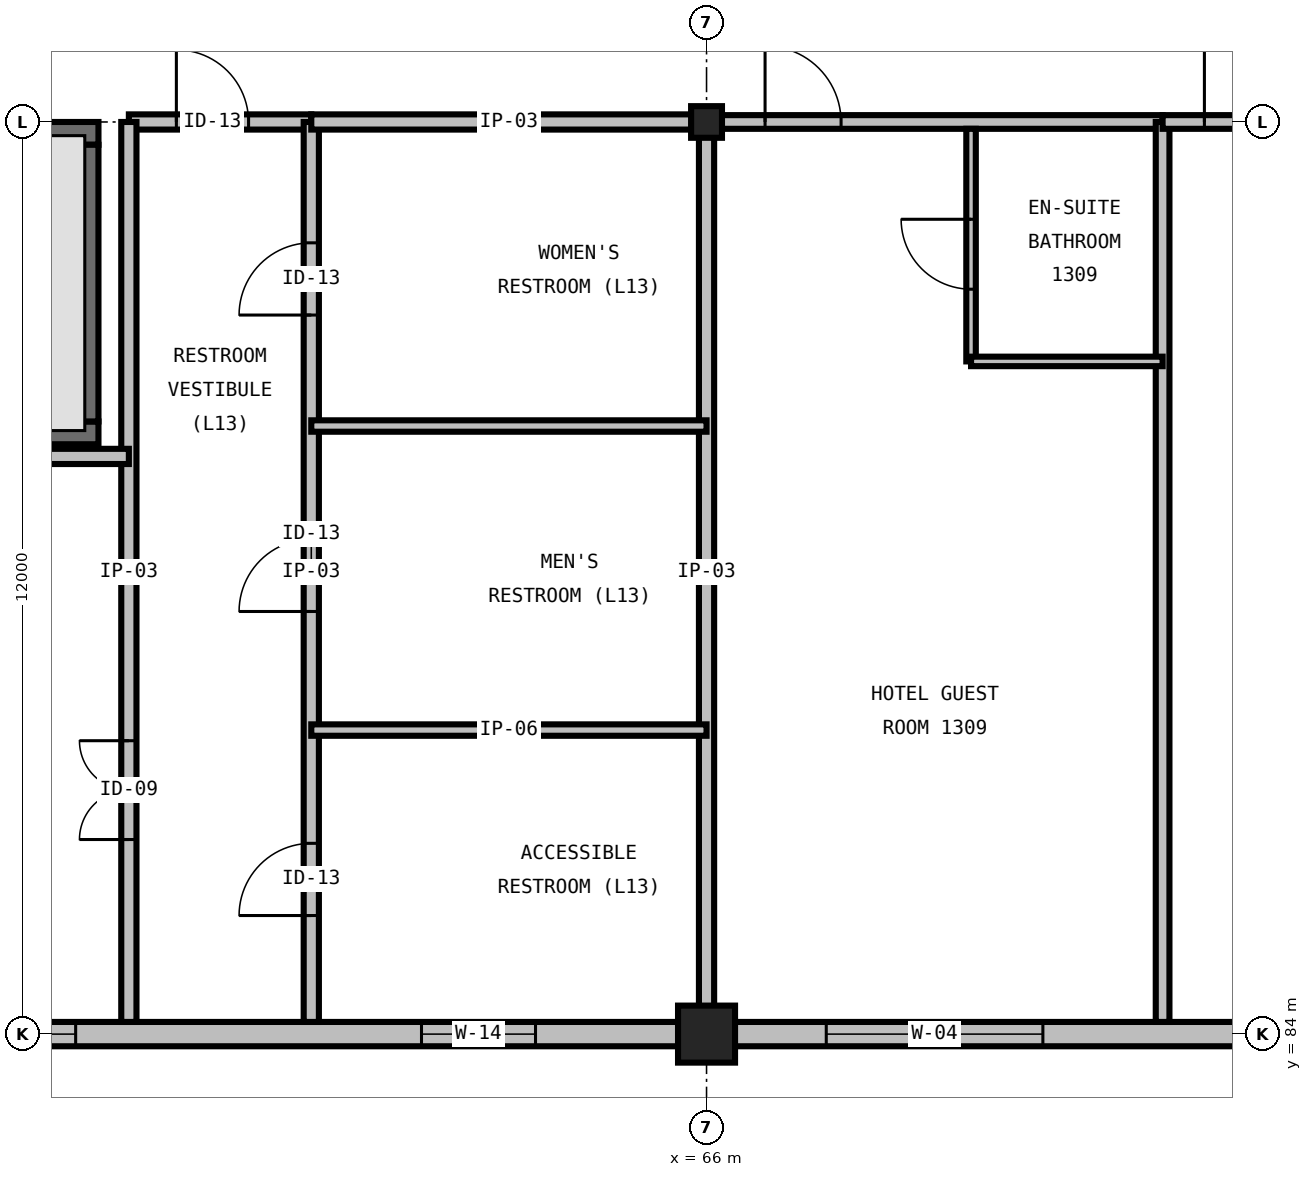
"""IFC4 building model, lengths in metres.
Left out: names, types, materials, properties, quantities, classifications, styles, units other than length and angle.
Written with IfcOpenShell. Run it as: python <this file> out.ifc"""

import sys

from ifc_helpers import new_model, si_unit, direction, frame, frame_2d, origin, origin_2d, place, context, subcontext, project, spatial, rectangle, i_section, extrude, element, fill, save


model = new_model("IFC4")
c1 = context("Model", 3, precision=1e-05, world=origin(), true_north=direction((0.0, 1.0)))
c2 = subcontext(c1, "Body", "Model", "MODEL_VIEW")
j1 = project(units=[si_unit("LENGTHUNIT", "METRE"), si_unit("PLANEANGLEUNIT", "RADIAN")], contexts=[c1])
p1 = place(None, origin())
s1 = spatial("IfcSite", under=j1, at=p1, CompositionType="ELEMENT")
p2 = place(p1, origin())
s2 = spatial("IfcBuilding", under=s1, at=p2, CompositionType="ELEMENT")
p3 = place(p2, frame((0.0, 0.0, 56.4)))
s3 = spatial("IfcBuildingStorey", under=s2, at=p3, CompositionType="ELEMENT", Elevation=56.4)
p4 = place(p3, frame((66.0, 84.0, 0.0), z_axis=(0.0, 0.0, 1.0), x_axis=(1.0, 0.0, 0.0)))
e1 = element("IfcColumn", 1, at=p4, inside=s3, PredefinedType="COLUMN", context=c2, shape_type="SweptSolid", body=[
    extrude(rectangle(XDim=0.75, YDim=0.75, at=origin_2d()), origin(), (0.0, 0.0, 1.0), 3.6),
])
p5 = place(p3, frame((66.0, 96.0, 0.0), z_axis=(0.0, 0.0, 1.0), x_axis=(1.0, 0.0, 0.0)))
e2 = element("IfcColumn", 2, at=p5, inside=s3, PredefinedType="COLUMN", context=c2, shape_type="SweptSolid", body=[
    extrude(i_section(OverallWidth=0.406, OverallDepth=0.416, WebThickness=0.03, FlangeThickness=0.048, FilletRadius=0.031, at=origin_2d()), origin(), (0.0, 0.0, 1.0), 3.6),
])
p6 = place(p3, frame((48.2, 91.91, 0.0), z_axis=(0.0, 0.0, 1.0), x_axis=(1.0, 0.0, 0.0)))
e3 = element("IfcWall", 3, at=p6, inside=s3, PredefinedType="SHEAR", context=c2, shape_type="SweptSolid", body=[
    extrude(rectangle(XDim=9.8, YDim=0.3, at=frame_2d((4.9, 0.0))), origin(), (0.0, 0.0, 1.0), 3.6),
])
p7 = place(p3, frame((58.0, 95.85, 0.0), z_axis=(0.0, 0.0, 1.0), x_axis=(-1.0, 0.0, 0.0)))
e4 = element("IfcWall", 4, at=p7, inside=s3, PredefinedType="SHEAR", context=c2, shape_type="SweptSolid", body=[
    extrude(rectangle(XDim=9.8, YDim=0.3, at=frame_2d((4.9, 0.0))), origin(), (0.0, 0.0, 1.0), 3.6),
])
p8 = place(p7, frame((8.25, 0.0, 0.0)))
e5 = element("IfcOpeningElement", 5, at=p8, cuts=e4, PredefinedType="OPENING", context=c2, shape_type="SweptSolid", body=[
    extrude(rectangle(XDim=1.1, YDim=2.2, at=frame_2d((0.55, 1.1))), frame((0.0, 0.165, 0.0), z_axis=(0.0, -1.0, 0.0), x_axis=(1.0, 0.0, 0.0)), (0.0, 0.0, 1.0), 0.33),
])
p9 = place(p3, frame((57.85, 92.06, 0.0), z_axis=(0.0, 0.0, 1.0), x_axis=(0.0, 1.0, 0.0)))
e6 = element("IfcWall", 6, at=p9, inside=s3, PredefinedType="SHEAR", context=c2, shape_type="SweptSolid", body=[
    extrude(rectangle(XDim=3.64, YDim=0.3, at=frame_2d((1.82, 0.0))), origin(), (0.0, 0.0, 1.0), 3.6),
])
p10 = place(p3, frame((54.0, 84.0, 0.0), z_axis=(0.0, 0.0, 1.0), x_axis=(1.0, 0.0, 0.0)))
e7 = element("IfcWall", 7, at=p10, inside=s3, PredefinedType="STANDARD", context=c2, shape_type="SweptSolid", body=[
    extrude(rectangle(XDim=12.0, YDim=0.32, at=frame_2d((6.0, 0.0))), origin(), (0.0, 0.0, 1.0), 2.536),
])
p11 = place(p10, frame((2.3, 0.0, 1.0)))
e8 = element("IfcOpeningElement", 8, at=p11, cuts=e7, PredefinedType="OPENING", context=c2, shape_type="SweptSolid", body=[
    extrude(rectangle(XDim=1.4, YDim=1.4, at=frame_2d((0.7, 0.7))), frame((0.0, 0.175, 0.0), z_axis=(0.0, -1.0, 0.0), x_axis=(1.0, 0.0, 0.0)), (0.0, 0.0, 1.0), 0.35),
])
p12 = place(p10, frame((8.25, 0.0, 1.0)))
e9 = element("IfcOpeningElement", 9, at=p12, cuts=e7, PredefinedType="OPENING", context=c2, shape_type="SweptSolid", body=[
    extrude(rectangle(XDim=1.5, YDim=1.35, at=frame_2d((0.75, 0.675))), frame((0.0, 0.175, 0.0), z_axis=(0.0, -1.0, 0.0), x_axis=(1.0, 0.0, 0.0)), (0.0, 0.0, 1.0), 0.35),
])
p13 = place(p3, frame((66.0, 84.0, 0.0), z_axis=(0.0, 0.0, 1.0), x_axis=(1.0, 0.0, 0.0)))
e10 = element("IfcWall", 10, at=p13, inside=s3, PredefinedType="STANDARD", context=c2, shape_type="SweptSolid", body=[
    extrude(rectangle(XDim=12.0, YDim=0.32, at=frame_2d((6.0, 0.0))), origin(), (0.0, 0.0, 1.0), 2.536),
])
p14 = place(p13, frame((1.575, 0.0, 0.7)))
e11 = element("IfcOpeningElement", 11, at=p14, cuts=e10, PredefinedType="OPENING", context=c2, shape_type="SweptSolid", body=[
    extrude(rectangle(XDim=2.85, YDim=1.65, at=frame_2d((1.425, 0.825))), frame((0.0, 0.175, 0.0), z_axis=(0.0, -1.0, 0.0), x_axis=(1.0, 0.0, 0.0)), (0.0, 0.0, 1.0), 0.35),
])
p15 = place(p13, frame((7.575, 0.0, 0.7)))
e12 = element("IfcOpeningElement", 12, at=p15, cuts=e10, PredefinedType="OPENING", context=c2, shape_type="SweptSolid", body=[
    extrude(rectangle(XDim=2.85, YDim=1.65, at=frame_2d((1.425, 0.825))), frame((0.0, 0.175, 0.0), z_axis=(0.0, -1.0, 0.0), x_axis=(1.0, 0.0, 0.0)), (0.0, 0.0, 1.0), 0.35),
])
p16 = place(p3, frame((58.4, 96.0, 0.0), z_axis=(0.0, 0.0, 1.0), x_axis=(1.0, 0.0, 0.0)))
e13 = element("IfcWall", 13, at=p16, inside=s3, PredefinedType="PARTITIONING", context=c2, shape_type="SweptSolid", body=[
    extrude(rectangle(XDim=2.4, YDim=0.2, at=frame_2d((1.2, 0.0))), origin(), (0.0, 0.0, 1.0), 2.359),
])
p17 = place(p16, frame((0.625, 0.0, 0.0)))
e14 = element("IfcOpeningElement", 14, at=p17, cuts=e13, PredefinedType="OPENING", context=c2, shape_type="SweptSolid", body=[
    extrude(rectangle(XDim=0.95, YDim=2.15, at=frame_2d((0.475, 1.075))), frame((0.0, 0.115, 0.0), z_axis=(0.0, -1.0, 0.0), x_axis=(1.0, 0.0, 0.0)), (0.0, 0.0, 1.0), 0.23),
])
p18 = place(p3, frame((58.4, 84.16, 0.0), z_axis=(0.0, 0.0, 1.0), x_axis=(0.0, 1.0, 0.0)))
e15 = element("IfcWall", 15, at=p18, inside=s3, PredefinedType="PARTITIONING", context=c2, shape_type="SweptSolid", body=[
    extrude(rectangle(XDim=11.84, YDim=0.2, at=frame_2d((5.92, 0.0))), origin(), (0.0, 0.0, 1.0), 3.29),
])
p19 = place(p18, frame((2.4, 0.0, 0.0)))
e16 = element("IfcOpeningElement", 16, at=p19, cuts=e15, PredefinedType="OPENING", context=c2, shape_type="SweptSolid", body=[
    extrude(rectangle(XDim=1.3, YDim=2.2, at=frame_2d((0.65, 1.1))), frame((0.0, 0.115, 0.0), z_axis=(0.0, -1.0, 0.0), x_axis=(1.0, 0.0, 0.0)), (0.0, 0.0, 1.0), 0.23),
])
p20 = place(p3, frame((60.8, 84.16, 0.0), z_axis=(0.0, 0.0, 1.0), x_axis=(0.0, 1.0, 0.0)))
e17 = element("IfcWall", 17, at=p20, inside=s3, PredefinedType="PARTITIONING", context=c2, shape_type="SweptSolid", body=[
    extrude(rectangle(XDim=11.84, YDim=0.2, at=frame_2d((5.92, 0.0))), origin(), (0.0, 0.0, 1.0), 3.29),
])
p21 = place(p20, frame((1.4, 0.0, 0.0)))
e18 = element("IfcOpeningElement", 18, at=p21, cuts=e17, PredefinedType="OPENING", context=c2, shape_type="SweptSolid", body=[
    extrude(rectangle(XDim=0.95, YDim=2.15, at=frame_2d((0.475, 1.075))), frame((0.0, 0.115, 0.0), z_axis=(0.0, -1.0, 0.0), x_axis=(1.0, 0.0, 0.0)), (0.0, 0.0, 1.0), 0.23),
])
p22 = place(p20, frame((5.4, 0.0, 0.0)))
e19 = element("IfcOpeningElement", 19, at=p22, cuts=e17, PredefinedType="OPENING", context=c2, shape_type="SweptSolid", body=[
    extrude(rectangle(XDim=0.95, YDim=2.15, at=frame_2d((0.475, 1.075))), frame((0.0, 0.115, 0.0), z_axis=(0.0, -1.0, 0.0), x_axis=(1.0, 0.0, 0.0)), (0.0, 0.0, 1.0), 0.23),
])
p23 = place(p20, frame((9.3, 0.0, 0.0)))
e20 = element("IfcOpeningElement", 20, at=p23, cuts=e17, PredefinedType="OPENING", context=c2, shape_type="SweptSolid", body=[
    extrude(rectangle(XDim=0.95, YDim=2.15, at=frame_2d((0.475, 1.075))), frame((0.0, 0.115, 0.0), z_axis=(0.0, -1.0, 0.0), x_axis=(1.0, 0.0, 0.0)), (0.0, 0.0, 1.0), 0.23),
])
p24 = place(p3, frame((66.0, 84.16, 0.0), z_axis=(0.0, 0.0, 1.0), x_axis=(0.0, 1.0, 0.0)))
e21 = element("IfcWall", 21, at=p24, inside=s3, PredefinedType="PARTITIONING", context=c2, shape_type="SweptSolid", body=[
    extrude(rectangle(XDim=11.84, YDim=0.2, at=frame_2d((5.92, 0.0))), origin(), (0.0, 0.0, 1.0), 2.59),
])
p25 = place(p3, frame((60.8, 96.0, 0.0), z_axis=(0.0, 0.0, 1.0), x_axis=(1.0, 0.0, 0.0)))
e22 = element("IfcWall", 22, at=p25, inside=s3, PredefinedType="PARTITIONING", context=c2, shape_type="SweptSolid", body=[
    extrude(rectangle(XDim=5.2, YDim=0.2, at=frame_2d((2.6, 0.0))), origin(), (0.0, 0.0, 1.0), 2.359),
])
for number, where, z_axis, x_axis in (
    (23, (60.8, 88.0, 0.0), (0.0, 0.0, 1.0), (1.0, 0.0, 0.0)),
    (24, (60.8, 92.0, 0.0), (0.0, 0.0, 1.0), (1.0, 0.0, 0.0)),
):
    element("IfcWall", number, at=place(p3, frame(where, z_axis=z_axis, x_axis=x_axis)), inside=s3, PredefinedType="PARTITIONING", context=c2, shape_type="SweptSolid", body=[
        extrude(rectangle(XDim=5.2, YDim=0.15, at=frame_2d((2.6, 0.0))), origin(), (0.0, 0.0, 1.0), 3.29),
    ])
p26 = place(p3, frame((48.0, 91.6, 0.0), z_axis=(0.0, 0.0, 1.0), x_axis=(1.0, 0.0, 0.0)))
e25 = element("IfcWall", 25, at=p26, inside=s3, PredefinedType="PARTITIONING", context=c2, shape_type="SweptSolid", body=[
    extrude(rectangle(XDim=10.4, YDim=0.2, at=frame_2d((5.2, 0.0))), origin(), (0.0, 0.0, 1.0), 3.29),
])
p27 = place(p3, frame((66.0, 96.0, 0.0), z_axis=(0.0, 0.0, 1.0), x_axis=(1.0, 0.0, 0.0)))
e26 = element("IfcWall", 26, at=p27, inside=s3, PredefinedType="PARTITIONING", context=c2, shape_type="SweptSolid", body=[
    extrude(rectangle(XDim=6.0, YDim=0.18, at=frame_2d((3.0, 0.0))), origin(), (0.0, 0.0, 1.0), 2.664),
])
p28 = place(p27, frame((0.77, 0.0, 0.0)))
e27 = element("IfcOpeningElement", 27, at=p28, cuts=e26, PredefinedType="OPENING", context=c2, shape_type="SweptSolid", body=[
    extrude(rectangle(XDim=1.0, YDim=2.15, at=frame_2d((0.5, 1.075))), frame((0.0, 0.105, 0.0), z_axis=(0.0, -1.0, 0.0), x_axis=(1.0, 0.0, 0.0)), (0.0, 0.0, 1.0), 0.21),
])
p29 = place(p3, frame((72.0, 84.16, 0.0), z_axis=(0.0, 0.0, 1.0), x_axis=(0.0, 1.0, 0.0)))
e28 = element("IfcWall", 28, at=p29, inside=s3, PredefinedType="PARTITIONING", context=c2, shape_type="SweptSolid", body=[
    extrude(rectangle(XDim=11.84, YDim=0.18, at=frame_2d((5.92, 0.0))), origin(), (0.0, 0.0, 1.0), 3.29),
])
p30 = place(p3, frame((69.48, 92.85, 0.0), z_axis=(0.0, 0.0, 1.0), x_axis=(0.0, 1.0, 0.0)))
e29 = element("IfcWall", 29, at=p30, inside=s3, PredefinedType="PARTITIONING", context=c2, shape_type="SweptSolid", body=[
    extrude(rectangle(XDim=3.06, YDim=0.125, at=frame_2d((1.53, 0.0))), origin(), (0.0, 0.0, 1.0), 3.29),
])
p31 = place(p30, frame((0.95, 0.0, 0.0)))
e30 = element("IfcOpeningElement", 30, at=p31, cuts=e29, PredefinedType="OPENING", context=c2, shape_type="SweptSolid", body=[
    extrude(rectangle(XDim=0.92, YDim=2.1, at=frame_2d((0.46, 1.05))), frame((0.0, 0.077, 0.0), z_axis=(0.0, -1.0, 0.0), x_axis=(1.0, 0.0, 0.0)), (0.0, 0.0, 1.0), 0.155),
])
p32 = place(p3, frame((69.48, 92.85, 0.0), z_axis=(0.0, 0.0, 1.0), x_axis=(1.0, 0.0, 0.0)))
e31 = element("IfcWall", 31, at=p32, inside=s3, PredefinedType="PARTITIONING", context=c2, shape_type="SweptSolid", body=[
    extrude(rectangle(XDim=2.52, YDim=0.125, at=frame_2d((1.26, 0.0))), origin(), (0.0, 0.0, 1.0), 3.29),
])
p33 = place(p3, frame((72.0, 96.0, 0.0), z_axis=(0.0, 0.0, 1.0), x_axis=(1.0, 0.0, 0.0)))
e32 = element("IfcWall", 32, at=p33, inside=s3, PredefinedType="PARTITIONING", context=c2, shape_type="SweptSolid", body=[
    extrude(rectangle(XDim=11.915, YDim=0.18, at=frame_2d((5.957, 0.0))), origin(), (0.0, 0.0, 1.0), 2.664),
])
p34 = place(p33, frame((0.55, 0.0, 0.0)))
e33 = element("IfcOpeningElement", 33, at=p34, cuts=e32, PredefinedType="OPENING", context=c2, shape_type="SweptSolid", body=[
    extrude(rectangle(XDim=1.1, YDim=2.2, at=frame_2d((0.55, 1.1))), frame((0.0, 0.105, 0.0), z_axis=(0.0, -1.0, 0.0), x_axis=(1.0, 0.0, 0.0)), (0.0, 0.0, 1.0), 0.21),
])
p35 = place(p11, origin())
e34 = element("IfcWindow", 34, at=p35, inside=s3, PartitioningType="SINGLE_PANEL", PredefinedType="WINDOW", context=c2, shape_type="SweptSolid", body=[
    extrude(rectangle(XDim=1.4, YDim=1.4, at=frame_2d((0.7, 0.7))), frame((0.0, 0.03, 0.0), z_axis=(0.0, -1.0, 0.0), x_axis=(1.0, 0.0, 0.0)), (0.0, 0.0, 1.0), 0.06),
])
fill(e8, e34)
p36 = place(p12, origin())
e35 = element("IfcWindow", 35, at=p36, inside=s3, PartitioningType="SINGLE_PANEL", PredefinedType="WINDOW", context=c2, shape_type="SweptSolid", body=[
    extrude(rectangle(XDim=1.5, YDim=1.35, at=frame_2d((0.75, 0.675))), frame((0.0, 0.03, 0.0), z_axis=(0.0, -1.0, 0.0), x_axis=(1.0, 0.0, 0.0)), (0.0, 0.0, 1.0), 0.06),
])
fill(e9, e35)
p37 = place(p14, origin())
e36 = element("IfcWindow", 36, at=p37, inside=s3, PartitioningType="TRIPLE_PANEL_VERTICAL", PredefinedType="WINDOW", context=c2, shape_type="SweptSolid", body=[
    extrude(rectangle(XDim=2.85, YDim=1.65, at=frame_2d((1.425, 0.825))), frame((0.0, 0.03, 0.0), z_axis=(0.0, -1.0, 0.0), x_axis=(1.0, 0.0, 0.0)), (0.0, 0.0, 1.0), 0.06),
])
fill(e11, e36)
p38 = place(p17, origin())
e37 = element("IfcDoor", 37, at=p38, inside=s3, OperationType="SINGLE_SWING_LEFT", PredefinedType="DOOR", context=c2, shape_type="SweptSolid", body=[
    extrude(rectangle(XDim=0.95, YDim=2.15, at=frame_2d((0.475, 1.075))), frame((0.0, 0.025, 0.0), z_axis=(0.0, -1.0, 0.0), x_axis=(1.0, 0.0, 0.0)), (0.0, 0.0, 1.0), 0.05),
])
fill(e14, e37)
p39 = place(p19, origin())
e38 = element("IfcDoor", 38, at=p39, inside=s3, OperationType="DOUBLE_DOOR_SINGLE_SWING", PredefinedType="DOOR", context=c2, shape_type="SweptSolid", body=[
    extrude(rectangle(XDim=1.3, YDim=2.2, at=frame_2d((0.65, 1.1))), frame((0.0, 0.025, 0.0), z_axis=(0.0, -1.0, 0.0), x_axis=(1.0, 0.0, 0.0)), (0.0, 0.0, 1.0), 0.05),
])
fill(e16, e38)
p40 = place(p21, origin())
e39 = element("IfcDoor", 39, at=p40, inside=s3, OperationType="SINGLE_SWING_LEFT", PredefinedType="DOOR", context=c2, shape_type="SweptSolid", body=[
    extrude(rectangle(XDim=0.95, YDim=2.15, at=frame_2d((0.475, 1.075))), frame((0.0, 0.025, 0.0), z_axis=(0.0, -1.0, 0.0), x_axis=(1.0, 0.0, 0.0)), (0.0, 0.0, 1.0), 0.05),
])
fill(e18, e39)
p41 = place(p22, origin())
e40 = element("IfcDoor", 40, at=p41, inside=s3, OperationType="SINGLE_SWING_LEFT", PredefinedType="DOOR", context=c2, shape_type="SweptSolid", body=[
    extrude(rectangle(XDim=0.95, YDim=2.15, at=frame_2d((0.475, 1.075))), frame((0.0, 0.025, 0.0), z_axis=(0.0, -1.0, 0.0), x_axis=(1.0, 0.0, 0.0)), (0.0, 0.0, 1.0), 0.05),
])
fill(e19, e40)
p42 = place(p23, origin())
e41 = element("IfcDoor", 41, at=p42, inside=s3, OperationType="SINGLE_SWING_LEFT", PredefinedType="DOOR", context=c2, shape_type="SweptSolid", body=[
    extrude(rectangle(XDim=0.95, YDim=2.15, at=frame_2d((0.475, 1.075))), frame((0.0, 0.025, 0.0), z_axis=(0.0, -1.0, 0.0), x_axis=(1.0, 0.0, 0.0)), (0.0, 0.0, 1.0), 0.05),
])
fill(e20, e41)
p43 = place(p28, origin())
e42 = element("IfcDoor", 42, at=p43, inside=s3, OperationType="SINGLE_SWING_LEFT", PredefinedType="DOOR", context=c2, shape_type="SweptSolid", body=[
    extrude(rectangle(XDim=1.0, YDim=2.15, at=frame_2d((0.5, 1.075))), frame((0.0, 0.025, 0.0), z_axis=(0.0, -1.0, 0.0), x_axis=(1.0, 0.0, 0.0)), (0.0, 0.0, 1.0), 0.05),
])
fill(e27, e42)
p44 = place(p31, origin())
e43 = element("IfcDoor", 43, at=p44, inside=s3, OperationType="SINGLE_SWING_RIGHT", PredefinedType="DOOR", context=c2, shape_type="SweptSolid", body=[
    extrude(rectangle(XDim=0.92, YDim=2.1, at=frame_2d((0.46, 1.05))), frame((0.0, 0.025, 0.0), z_axis=(0.0, -1.0, 0.0), x_axis=(1.0, 0.0, 0.0)), (0.0, 0.0, 1.0), 0.05),
])
fill(e30, e43)
p45 = place(p34, origin())
e44 = element("IfcDoor", 44, at=p45, inside=s3, OperationType="SINGLE_SWING_LEFT", PredefinedType="DOOR", context=c2, shape_type="SweptSolid", body=[
    extrude(rectangle(XDim=1.1, YDim=2.2, at=frame_2d((0.55, 1.1))), frame((0.0, 0.025, 0.0), z_axis=(0.0, -1.0, 0.0), x_axis=(1.0, 0.0, 0.0)), (0.0, 0.0, 1.0), 0.05),
])
fill(e33, e44)
save(model, sys.argv[1])
